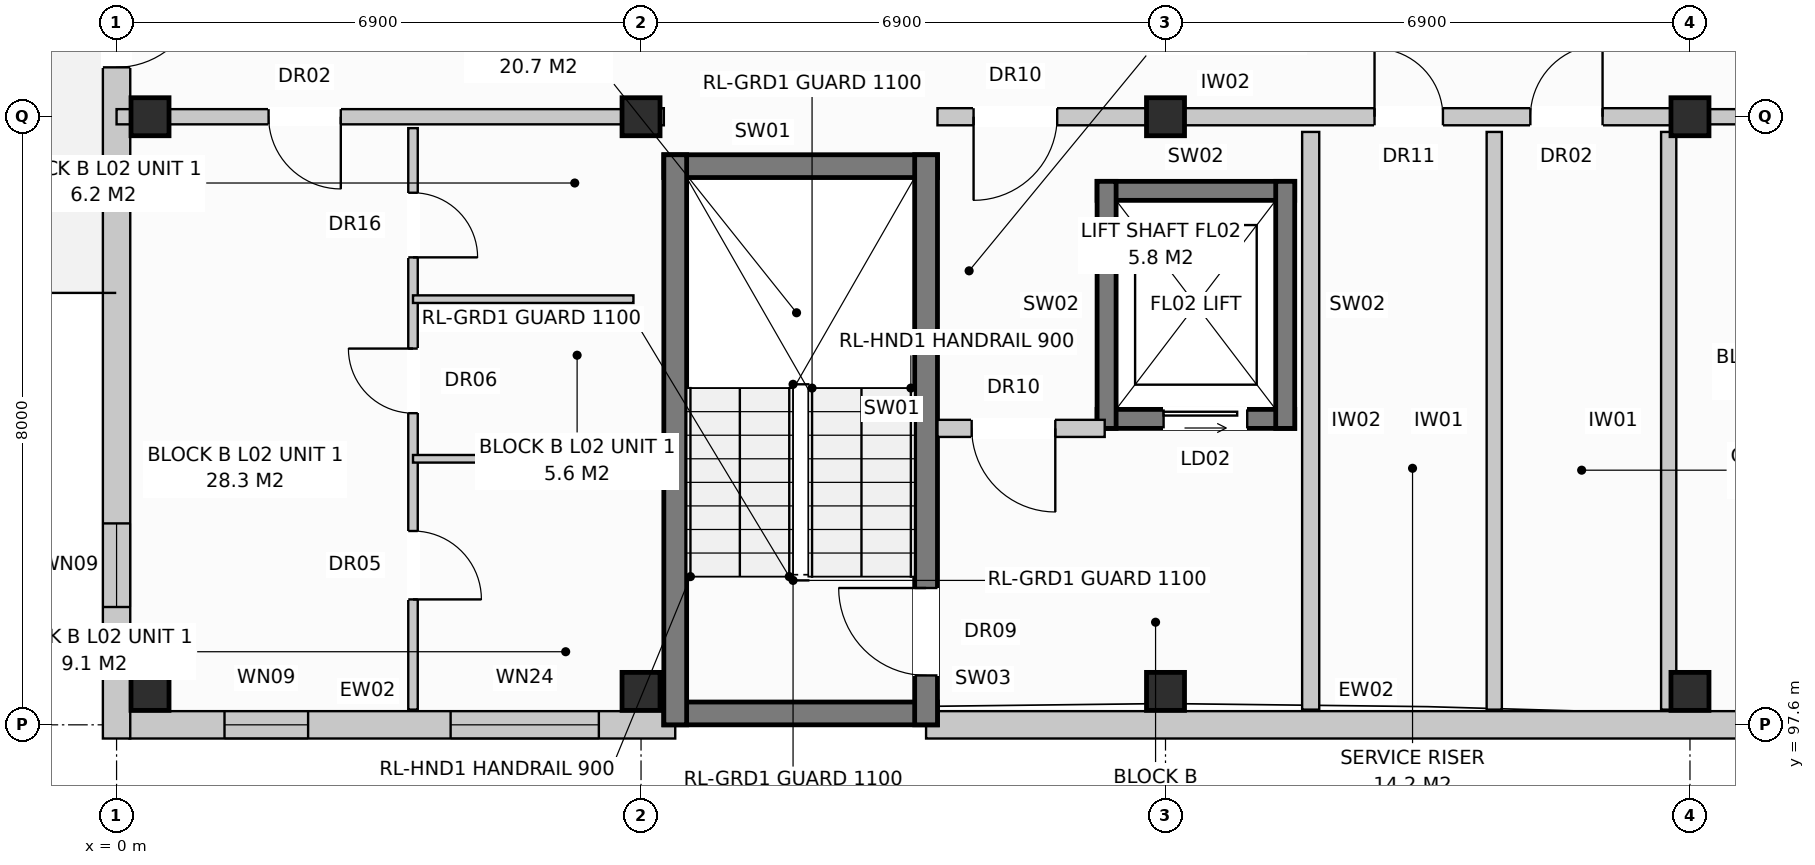
"""IFC4 building model, lengths in metres.
Left out: names, types, materials, properties, quantities, classifications, styles, units other than length and angle.
Written with IfcOpenShell. Run it as: python <this file> out.ifc"""

import sys

from ifc_helpers import new_model, si_unit, direction, frame, frame_2d, origin, origin_with_axes, origin_2d, place, context, subcontext, project, spatial, rectangle, extrude, element, fill, save


model = new_model("IFC4")
c1 = context("Model", 3, precision=1e-05, world=origin(), true_north=direction((0.0, 1.0)))
c2 = subcontext(c1, "Body", "Model", "MODEL_VIEW")
j1 = project(units=[si_unit("LENGTHUNIT", "METRE"), si_unit("PLANEANGLEUNIT", "RADIAN")], contexts=[c1])
p1 = place(None, origin())
s1 = spatial("IfcSite", under=j1, at=p1, CompositionType="ELEMENT")
p2 = place(p1, origin())
s2 = spatial("IfcBuilding", under=s1, at=p2, CompositionType="ELEMENT")
p3 = place(p2, frame((0.0, 0.0, 8.0)))
s3 = spatial("IfcBuildingStorey", under=s2, at=p3, CompositionType="ELEMENT", Elevation=8.0)
for number, where, z_axis, x_axis in (
    (1, (0.44, 98.04, 0.0), (0.0, 0.0, 1.0), (1.0, 0.0, 0.0)),
    (2, (0.44, 105.6, 0.0), (0.0, 0.0, 1.0), (1.0, 0.0, 0.0)),
    (3, (6.9, 98.04, 0.0), (0.0, 0.0, 1.0), (1.0, 0.0, 0.0)),
    (4, (6.9, 105.6, 0.0), (0.0, 0.0, 1.0), (1.0, 0.0, 0.0)),
    (5, (13.8, 98.04, 0.0), (0.0, 0.0, 1.0), (1.0, 0.0, 0.0)),
    (6, (13.8, 105.6, 0.0), (0.0, 0.0, 1.0), (1.0, 0.0, 0.0)),
    (7, (20.7, 98.04, 0.0), (0.0, 0.0, 1.0), (1.0, 0.0, 0.0)),
    (8, (20.7, 105.6, 0.0), (0.0, 0.0, 1.0), (1.0, 0.0, 0.0)),
):
    element("IfcColumn", number, at=place(p3, frame(where, z_axis=z_axis, x_axis=x_axis)), inside=s3, PredefinedType="COLUMN", context=c2, shape_type="SweptSolid", body=[
        extrude(rectangle(XDim=0.5, YDim=0.5, at=origin_2d()), origin(), (0.0, 0.0, 1.0), 3.2),
    ])
p4 = place(p3, frame((0.17, 97.6, 0.0), z_axis=(0.0, 0.0, 1.0), x_axis=(1.0, 0.0, 0.0)))
e9 = element("IfcWall", 9, at=p4, inside=s3, PredefinedType="STANDARD", context=c2, shape_type="SweptSolid", body=[
    extrude(rectangle(XDim=7.18, YDim=0.36, at=frame_2d((3.59, 0.0))), origin(), (0.0, 0.0, 1.0), 2.94),
])
p5 = place(p4, frame((1.25, 0.0, 0.72)))
e10 = element("IfcOpeningElement", 10, at=p5, cuts=e9, PredefinedType="OPENING", context=c2, shape_type="SweptSolid", body=[
    extrude(rectangle(XDim=1.1, YDim=1.5, at=frame_2d((0.55, 0.75))), frame((0.0, 0.192, 0.0), z_axis=(0.0, -1.0, 0.0), x_axis=(1.0, 0.0, 0.0)), (0.0, 0.0, 1.0), 0.384),
])
p6 = place(p4, frame((4.225, 0.0, 0.8)))
e11 = element("IfcOpeningElement", 11, at=p6, cuts=e9, PredefinedType="OPENING", context=c2, shape_type="SweptSolid", body=[
    extrude(rectangle(XDim=1.95, YDim=1.65, at=frame_2d((0.975, 0.825))), frame((0.0, 0.192, 0.0), z_axis=(0.0, -1.0, 0.0), x_axis=(1.0, 0.0, 0.0)), (0.0, 0.0, 1.0), 0.384),
])
p7 = place(p3, frame((10.65, 97.6, 0.0), z_axis=(0.0, 0.0, 1.0), x_axis=(1.0, 0.0, 0.0)))
e12 = element("IfcWall", 12, at=p7, inside=s3, PredefinedType="STANDARD", context=c2, shape_type="SweptSolid", body=[
    extrude(rectangle(XDim=17.4, YDim=0.36, at=frame_2d((8.7, 0.0))), origin(), (0.0, 0.0, 1.0), 2.94),
])
p8 = place(p7, frame((11.893, 0.0, 0.0)))
e13 = element("IfcOpeningElement", 13, at=p8, cuts=e12, PredefinedType="OPENING", context=c2, shape_type="SweptSolid", body=[
    extrude(rectangle(XDim=0.95, YDim=2.1, at=frame_2d((0.475, 1.05))), frame((0.0, 0.192, 0.0), z_axis=(0.0, -1.0, 0.0), x_axis=(1.0, 0.0, 0.0)), (0.0, 0.0, 1.0), 0.384),
])
p9 = place(p7, frame((14.97, 0.0, 0.72)))
e14 = element("IfcOpeningElement", 14, at=p9, cuts=e12, PredefinedType="OPENING", context=c2, shape_type="SweptSolid", body=[
    extrude(rectangle(XDim=1.1, YDim=1.5, at=frame_2d((0.55, 0.75))), frame((0.0, 0.192, 0.0), z_axis=(0.0, -1.0, 0.0), x_axis=(1.0, 0.0, 0.0)), (0.0, 0.0, 1.0), 0.384),
])
p10 = place(p3, frame((0.0, 97.42, 0.0), z_axis=(0.0, 0.0, 1.0), x_axis=(0.0, 1.0, 0.0)))
e15 = element("IfcWall", 15, at=p10, inside=s3, PredefinedType="STANDARD", context=c2, shape_type="SweptSolid", body=[
    extrude(rectangle(XDim=18.76, YDim=0.36, at=frame_2d((9.38, 0.0))), origin(), (0.0, 0.0, 1.0), 2.94),
])
p11 = place(p10, frame((8.83, 0.0, 0.0)))
e16 = element("IfcOpeningElement", 16, at=p11, cuts=e15, PredefinedType="OPENING", context=c2, shape_type="SweptSolid", body=[
    extrude(rectangle(XDim=1.1, YDim=2.1, at=frame_2d((0.55, 1.05))), frame((0.0, 0.192, 0.0), z_axis=(0.0, -1.0, 0.0), x_axis=(1.0, 0.0, 0.0)), (0.0, 0.0, 1.0), 0.384),
])
p12 = place(p10, frame((1.73, 0.0, 0.72)))
e17 = element("IfcOpeningElement", 17, at=p12, cuts=e15, PredefinedType="OPENING", context=c2, shape_type="SweptSolid", body=[
    extrude(rectangle(XDim=1.1, YDim=1.5, at=frame_2d((0.55, 0.75))), frame((0.0, 0.192, 0.0), z_axis=(0.0, -1.0, 0.0), x_axis=(1.0, 0.0, 0.0)), (0.0, 0.0, 1.0), 0.384),
])
p13 = place(p10, frame((15.93, 0.0, 0.72)))
e18 = element("IfcOpeningElement", 18, at=p13, cuts=e15, PredefinedType="OPENING", context=c2, shape_type="SweptSolid", body=[
    extrude(rectangle(XDim=1.1, YDim=1.5, at=frame_2d((0.55, 0.75))), frame((0.0, 0.192, 0.0), z_axis=(0.0, -1.0, 0.0), x_axis=(1.0, 0.0, 0.0)), (0.0, 0.0, 1.0), 0.384),
])
for number, where, z_axis, x_axis in (
    (19, (7.2, 97.75, 0.0), (0.0, 0.0, 1.0), (1.0, 0.0, 0.0)),
    (20, (7.2, 104.95, 0.0), (0.0, 0.0, 1.0), (1.0, 0.0, 0.0)),
):
    element("IfcWall", number, at=place(p3, frame(where, z_axis=z_axis, x_axis=x_axis)), inside=s3, PredefinedType="SHEAR", context=c2, shape_type="SweptSolid", body=[
        extrude(rectangle(XDim=3.6, YDim=0.3, at=frame_2d((1.8, 0.0))), origin(), (0.0, 0.0, 1.0), 2.94),
    ])
p14 = place(p3, frame((7.35, 97.6, 0.0), z_axis=(0.0, 0.0, 1.0), x_axis=(0.0, 1.0, 0.0)))
e21 = element("IfcWall", 21, at=p14, inside=s3, PredefinedType="SHEAR", context=c2, shape_type="SweptSolid", body=[
    extrude(rectangle(XDim=7.5, YDim=0.3, at=frame_2d((3.75, 0.0))), origin(), (0.0, 0.0, 1.0), 2.94),
])
p15 = place(p3, frame((10.65, 97.6, 0.0), z_axis=(0.0, 0.0, 1.0), x_axis=(0.0, 1.0, 0.0)))
e22 = element("IfcWall", 22, at=p15, inside=s3, PredefinedType="SHEAR", context=c2, shape_type="SweptSolid", body=[
    extrude(rectangle(XDim=7.5, YDim=0.3, at=frame_2d((3.75, 0.0))), origin(), (0.0, 0.0, 1.0), 2.94),
])
p16 = place(p15, frame((0.65, 0.0, 0.0)))
e23 = element("IfcOpeningElement", 23, at=p16, cuts=e22, PredefinedType="OPENING", context=c2, shape_type="SweptSolid", body=[
    extrude(rectangle(XDim=1.15, YDim=2.15, at=frame_2d((0.575, 1.075))), frame((0.0, 0.162, 0.0), z_axis=(0.0, -1.0, 0.0), x_axis=(1.0, 0.0, 0.0)), (0.0, 0.0, 1.0), 0.324),
])
p17 = place(p3, frame((12.9, 101.625, 0.0), z_axis=(0.0, 0.0, 1.0), x_axis=(1.0, 0.0, 0.0)))
e24 = element("IfcWall", 24, at=p17, inside=s3, PredefinedType="SHEAR", context=c2, shape_type="SweptSolid", body=[
    extrude(rectangle(XDim=2.6, YDim=0.25, at=frame_2d((1.3, 0.0))), origin(), (0.0, 0.0, 1.0), 2.94),
])
p18 = place(p17, frame((0.875, 0.0, 0.0)))
e25 = element("IfcOpeningElement", 25, at=p18, cuts=e24, PredefinedType="OPENING", context=c2, shape_type="SweptSolid", body=[
    extrude(rectangle(XDim=1.1, YDim=2.1, at=frame_2d((0.55, 1.05))), frame((0.0, 0.137, 0.0), z_axis=(0.0, -1.0, 0.0), x_axis=(1.0, 0.0, 0.0)), (0.0, 0.0, 1.0), 0.274),
])
p19 = place(p3, frame((12.9, 104.625, 0.0), z_axis=(0.0, 0.0, 1.0), x_axis=(1.0, 0.0, 0.0)))
e26 = element("IfcWall", 26, at=p19, inside=s3, PredefinedType="SHEAR", context=c2, shape_type="SweptSolid", body=[
    extrude(rectangle(XDim=2.6, YDim=0.25, at=frame_2d((1.3, 0.0))), origin(), (0.0, 0.0, 1.0), 2.94),
])
for number, where, z_axis, x_axis in (
    (27, (13.025, 101.5, 0.0), (0.0, 0.0, 1.0), (0.0, 1.0, 0.0)),
    (28, (15.375, 101.5, 0.0), (0.0, 0.0, 1.0), (0.0, 1.0, 0.0)),
):
    element("IfcWall", number, at=place(p3, frame(where, z_axis=z_axis, x_axis=x_axis)), inside=s3, PredefinedType="SHEAR", context=c2, shape_type="SweptSolid", body=[
        extrude(rectangle(XDim=3.25, YDim=0.25, at=frame_2d((1.625, 0.0))), origin(), (0.0, 0.0, 1.0), 2.94),
    ])
p20 = place(p3, frame((15.71, 97.8, 0.0), z_axis=(0.0, 0.0, 1.0), x_axis=(0.0, 1.0, 0.0)))
e29 = element("IfcWall", 29, at=p20, inside=s3, PredefinedType="PARTITIONING", context=c2, shape_type="SweptSolid", body=[
    extrude(rectangle(XDim=7.6, YDim=0.225, at=frame_2d((3.8, 0.0))), origin(), (0.0, 0.0, 1.0), 2.59),
])
p21 = place(p3, frame((10.8, 101.5, 0.0), z_axis=(0.0, 0.0, 1.0), x_axis=(1.0, 0.0, 0.0)))
e30 = element("IfcWall", 30, at=p21, inside=s3, PredefinedType="PARTITIONING", context=c2, shape_type="SweptSolid", body=[
    extrude(rectangle(XDim=2.2, YDim=0.225, at=frame_2d((1.1, 0.0))), origin(), (0.0, 0.0, 1.0), 2.94),
])
p22 = place(p21, frame((0.45, 0.0, 0.0)))
e31 = element("IfcOpeningElement", 31, at=p22, cuts=e30, PredefinedType="OPENING", context=c2, shape_type="SweptSolid", body=[
    extrude(rectangle(XDim=1.1, YDim=2.15, at=frame_2d((0.55, 1.075))), frame((0.0, 0.125, 0.0), z_axis=(0.0, -1.0, 0.0), x_axis=(1.0, 0.0, 0.0)), (0.0, 0.0, 1.0), 0.249),
])
p23 = place(p3, frame((6.9, 105.6, 0.0), z_axis=(0.0, 0.0, 1.0), x_axis=(1.0, 0.0, 0.0)))
e32 = element("IfcWall", 32, at=p23, inside=s3, PredefinedType="PARTITIONING", context=c2, shape_type="SweptSolid", body=[
    extrude(rectangle(XDim=0.3, YDim=0.225, at=frame_2d((0.15, 0.0))), origin(), (0.0, 0.0, 1.0), 2.94),
])
for number, where, z_axis, x_axis in (
    (33, (18.125, 97.8, 0.0), (0.0, 0.0, 1.0), (0.0, 1.0, 0.0)),
    (34, (20.42, 97.8, 0.0), (0.0, 0.0, 1.0), (0.0, 1.0, 0.0)),
):
    element("IfcWall", number, at=place(p3, frame(where, z_axis=z_axis, x_axis=x_axis)), inside=s3, PredefinedType="PARTITIONING", context=c2, shape_type="SweptSolid", body=[
        extrude(rectangle(XDim=7.6, YDim=0.2, at=frame_2d((3.8, 0.0))), origin(), (0.0, 0.0, 1.0), 2.94),
    ])
p24 = place(p3, frame((10.8, 105.6, 0.0), z_axis=(0.0, 0.0, 1.0), x_axis=(1.0, 0.0, 0.0)))
e35 = element("IfcWall", 35, at=p24, inside=s3, PredefinedType="PARTITIONING", context=c2, shape_type="SweptSolid", body=[
    extrude(rectangle(XDim=9.9, YDim=0.225, at=frame_2d((4.95, 0.0))), origin(), (0.0, 0.0, 1.0), 2.38),
])
p25 = place(p24, frame((0.475, 0.0, 0.0)))
e36 = element("IfcOpeningElement", 36, at=p25, cuts=e35, PredefinedType="OPENING", context=c2, shape_type="SweptSolid", body=[
    extrude(rectangle(XDim=1.1, YDim=2.15, at=frame_2d((0.55, 1.075))), frame((0.0, 0.125, 0.0), z_axis=(0.0, -1.0, 0.0), x_axis=(1.0, 0.0, 0.0)), (0.0, 0.0, 1.0), 0.249),
])
p26 = place(p24, frame((5.75, 0.0, 0.0)))
e37 = element("IfcOpeningElement", 37, at=p26, cuts=e35, PredefinedType="OPENING", context=c2, shape_type="SweptSolid", body=[
    extrude(rectangle(XDim=0.9, YDim=2.1, at=frame_2d((0.45, 1.05))), frame((0.0, 0.125, 0.0), z_axis=(0.0, -1.0, 0.0), x_axis=(1.0, 0.0, 0.0)), (0.0, 0.0, 1.0), 0.249),
])
p27 = place(p24, frame((7.8, 0.0, 0.0)))
e38 = element("IfcOpeningElement", 38, at=p27, cuts=e35, PredefinedType="OPENING", context=c2, shape_type="SweptSolid", body=[
    extrude(rectangle(XDim=0.95, YDim=2.15, at=frame_2d((0.475, 1.075))), frame((0.0, 0.125, 0.0), z_axis=(0.0, -1.0, 0.0), x_axis=(1.0, 0.0, 0.0)), (0.0, 0.0, 1.0), 0.249),
])
p28 = place(p3, frame((0.0, 105.6, 0.0), z_axis=(0.0, 0.0, 1.0), x_axis=(1.0, 0.0, 0.0)))
e39 = element("IfcWall", 39, at=p28, inside=s3, PredefinedType="PARTITIONING", context=c2, shape_type="SweptSolid", body=[
    extrude(rectangle(XDim=6.9, YDim=0.2, at=frame_2d((3.45, 0.0))), origin(), (0.0, 0.0, 1.0), 2.38),
])
p29 = place(p28, frame((2.0, 0.0, 0.0)))
e40 = element("IfcOpeningElement", 40, at=p29, cuts=e39, PredefinedType="OPENING", context=c2, shape_type="SweptSolid", body=[
    extrude(rectangle(XDim=0.95, YDim=2.15, at=frame_2d((0.475, 1.075))), frame((0.0, 0.112, 0.0), z_axis=(0.0, -1.0, 0.0), x_axis=(1.0, 0.0, 0.0)), (0.0, 0.0, 1.0), 0.224),
])
p30 = place(p3, frame((3.9, 105.45, 0.0), z_axis=(0.0, 0.0, 1.0), x_axis=(0.0, -1.0, 0.0)))
e41 = element("IfcWall", 41, at=p30, inside=s3, PredefinedType="PARTITIONING", context=c2, shape_type="SweptSolid", body=[
    extrude(rectangle(XDim=7.65, YDim=0.125, at=frame_2d((3.825, 0.0))), origin(), (0.0, 0.0, 1.0), 2.94),
])
p31 = place(p30, frame((0.85, 0.0, 0.0)))
e42 = element("IfcOpeningElement", 42, at=p31, cuts=e41, PredefinedType="OPENING", context=c2, shape_type="SweptSolid", body=[
    extrude(rectangle(XDim=0.85, YDim=2.1, at=frame_2d((0.425, 1.05))), frame((0.0, 0.074, 0.0), z_axis=(0.0, -1.0, 0.0), x_axis=(1.0, 0.0, 0.0)), (0.0, 0.0, 1.0), 0.149),
])
p32 = place(p30, frame((2.9, 0.0, 0.0)))
e43 = element("IfcOpeningElement", 43, at=p32, cuts=e41, PredefinedType="OPENING", context=c2, shape_type="SweptSolid", body=[
    extrude(rectangle(XDim=0.85, YDim=2.05, at=frame_2d((0.425, 1.025))), frame((0.0, 0.074, 0.0), z_axis=(0.0, -1.0, 0.0), x_axis=(1.0, 0.0, 0.0)), (0.0, 0.0, 1.0), 0.149),
])
p33 = place(p30, frame((5.3, 0.0, 0.0)))
e44 = element("IfcOpeningElement", 44, at=p33, cuts=e41, PredefinedType="OPENING", context=c2, shape_type="SweptSolid", body=[
    extrude(rectangle(XDim=0.9, YDim=2.1, at=frame_2d((0.45, 1.05))), frame((0.0, 0.074, 0.0), z_axis=(0.0, -1.0, 0.0), x_axis=(1.0, 0.0, 0.0)), (0.0, 0.0, 1.0), 0.149),
])
for number, where, z_axis, x_axis in (
    (45, (3.9, 103.2, 0.0), (0.0, 0.0, 1.0), (1.0, 0.0, 0.0)),
    (46, (3.9, 101.1, 0.0), (0.0, 0.0, 1.0), (1.0, 0.0, 0.0)),
):
    element("IfcWall", number, at=place(p3, frame(where, z_axis=z_axis, x_axis=x_axis)), inside=s3, PredefinedType="PARTITIONING", context=c2, shape_type="SweptSolid", body=[
        extrude(rectangle(XDim=2.9, YDim=0.1, at=frame_2d((1.45, 0.0))), origin(), (0.0, 0.0, 1.0), 2.94),
    ])
p34 = place(p3, frame((20.7, 105.6, 0.0), z_axis=(0.0, 0.0, 1.0), x_axis=(1.0, 0.0, 0.0)))
e47 = element("IfcWall", 47, at=p34, inside=s3, PredefinedType="PARTITIONING", context=c2, shape_type="SweptSolid", body=[
    extrude(rectangle(XDim=6.9, YDim=0.2, at=frame_2d((3.45, 0.0))), origin(), (0.0, 0.0, 1.0), 2.38),
])
p35 = place(p34, frame((2.0, 0.0, 0.0)))
e48 = element("IfcOpeningElement", 48, at=p35, cuts=e47, PredefinedType="OPENING", context=c2, shape_type="SweptSolid", body=[
    extrude(rectangle(XDim=0.95, YDim=2.15, at=frame_2d((0.475, 1.075))), frame((0.0, 0.112, 0.0), z_axis=(0.0, -1.0, 0.0), x_axis=(1.0, 0.0, 0.0)), (0.0, 0.0, 1.0), 0.224),
])
p36 = place(p5, origin_with_axes())
e49 = element("IfcWindow", 49, at=p36, inside=s3, PartitioningType="SINGLE_PANEL", PredefinedType="WINDOW", context=c2, shape_type="SweptSolid", body=[
    extrude(rectangle(XDim=1.1, YDim=1.5, at=frame_2d((0.55, 0.75))), frame((0.0, 0.03, 0.0), z_axis=(0.0, -1.0, 0.0), x_axis=(1.0, 0.0, 0.0)), (0.0, 0.0, 1.0), 0.06),
])
fill(e10, e49)
p37 = place(p6, origin_with_axes())
e50 = element("IfcWindow", 50, at=p37, inside=s3, PartitioningType="SINGLE_PANEL", PredefinedType="WINDOW", context=c2, shape_type="SweptSolid", body=[
    extrude(rectangle(XDim=1.95, YDim=1.65, at=frame_2d((0.975, 0.825))), frame((0.0, 0.03, 0.0), z_axis=(0.0, -1.0, 0.0), x_axis=(1.0, 0.0, 0.0)), (0.0, 0.0, 1.0), 0.06),
])
fill(e11, e50)
p38 = place(p11, frame((1.1, 0.0, 0.0), z_axis=(0.0, 0.0, 1.0), x_axis=(-1.0, 0.0, 0.0)))
e51 = element("IfcDoor", 51, at=p38, inside=s3, OperationType="SINGLE_SWING_RIGHT", PredefinedType="DOOR", context=c2, shape_type="SweptSolid", body=[
    extrude(rectangle(XDim=1.1, YDim=2.1, at=frame_2d((0.55, 1.05))), frame((0.0, 0.025, 0.0), z_axis=(0.0, -1.0, 0.0), x_axis=(1.0, 0.0, 0.0)), (0.0, 0.0, 1.0), 0.05),
])
fill(e16, e51)
p39 = place(p12, origin_with_axes())
e52 = element("IfcWindow", 52, at=p39, inside=s3, PartitioningType="SINGLE_PANEL", PredefinedType="WINDOW", context=c2, shape_type="SweptSolid", body=[
    extrude(rectangle(XDim=1.1, YDim=1.5, at=frame_2d((0.55, 0.75))), frame((0.0, 0.03, 0.0), z_axis=(0.0, -1.0, 0.0), x_axis=(1.0, 0.0, 0.0)), (0.0, 0.0, 1.0), 0.06),
])
fill(e17, e52)
p40 = place(p16, origin_with_axes())
e53 = element("IfcDoor", 53, at=p40, inside=s3, OperationType="SINGLE_SWING_RIGHT", PredefinedType="DOOR", context=c2, shape_type="SweptSolid", body=[
    extrude(rectangle(XDim=1.15, YDim=2.15, at=frame_2d((0.575, 1.075))), frame((0.0, 0.025, 0.0), z_axis=(0.0, -1.0, 0.0), x_axis=(1.0, 0.0, 0.0)), (0.0, 0.0, 1.0), 0.05),
])
fill(e23, e53)
p41 = place(p18, origin_with_axes())
e54 = element("IfcDoor", 54, at=p41, inside=s3, OperationType="SLIDING_TO_LEFT", PredefinedType="DOOR", context=c2, shape_type="SweptSolid", body=[
    extrude(rectangle(XDim=1.1, YDim=2.1, at=frame_2d((0.55, 1.05))), frame((0.0, 0.025, 0.0), z_axis=(0.0, -1.0, 0.0), x_axis=(1.0, 0.0, 0.0)), (0.0, 0.0, 1.0), 0.05),
])
fill(e25, e54)
p42 = place(p22, frame((1.1, 0.0, 0.0), z_axis=(0.0, 0.0, 1.0), x_axis=(-1.0, 0.0, 0.0)))
e55 = element("IfcDoor", 55, at=p42, inside=s3, OperationType="SINGLE_SWING_RIGHT", PredefinedType="DOOR", context=c2, shape_type="SweptSolid", body=[
    extrude(rectangle(XDim=1.1, YDim=2.15, at=frame_2d((0.55, 1.075))), frame((0.0, 0.025, 0.0), z_axis=(0.0, -1.0, 0.0), x_axis=(1.0, 0.0, 0.0)), (0.0, 0.0, 1.0), 0.05),
])
fill(e31, e55)
p43 = place(p25, frame((1.1, 0.0, 0.0), z_axis=(0.0, 0.0, 1.0), x_axis=(-1.0, 0.0, 0.0)))
e56 = element("IfcDoor", 56, at=p43, inside=s3, OperationType="SINGLE_SWING_LEFT", PredefinedType="DOOR", context=c2, shape_type="SweptSolid", body=[
    extrude(rectangle(XDim=1.1, YDim=2.15, at=frame_2d((0.55, 1.075))), frame((0.0, 0.025, 0.0), z_axis=(0.0, -1.0, 0.0), x_axis=(1.0, 0.0, 0.0)), (0.0, 0.0, 1.0), 0.05),
])
fill(e36, e56)
p44 = place(p26, origin_with_axes())
e57 = element("IfcDoor", 57, at=p44, inside=s3, OperationType="SINGLE_SWING_LEFT", PredefinedType="DOOR", context=c2, shape_type="SweptSolid", body=[
    extrude(rectangle(XDim=0.9, YDim=2.1, at=frame_2d((0.45, 1.05))), frame((0.0, 0.025, 0.0), z_axis=(0.0, -1.0, 0.0), x_axis=(1.0, 0.0, 0.0)), (0.0, 0.0, 1.0), 0.05),
])
fill(e37, e57)
p45 = place(p27, origin_with_axes())
e58 = element("IfcDoor", 58, at=p45, inside=s3, OperationType="SINGLE_SWING_RIGHT", PredefinedType="DOOR", context=c2, shape_type="SweptSolid", body=[
    extrude(rectangle(XDim=0.95, YDim=2.15, at=frame_2d((0.475, 1.075))), frame((0.0, 0.025, 0.0), z_axis=(0.0, -1.0, 0.0), x_axis=(1.0, 0.0, 0.0)), (0.0, 0.0, 1.0), 0.05),
])
fill(e38, e58)
p46 = place(p29, frame((0.95, 0.0, 0.0), z_axis=(0.0, 0.0, 1.0), x_axis=(-1.0, 0.0, 0.0)))
e59 = element("IfcDoor", 59, at=p46, inside=s3, OperationType="SINGLE_SWING_RIGHT", PredefinedType="DOOR", context=c2, shape_type="SweptSolid", body=[
    extrude(rectangle(XDim=0.95, YDim=2.15, at=frame_2d((0.475, 1.075))), frame((0.0, 0.025, 0.0), z_axis=(0.0, -1.0, 0.0), x_axis=(1.0, 0.0, 0.0)), (0.0, 0.0, 1.0), 0.05),
])
fill(e40, e59)
p47 = place(p31, origin_with_axes())
e60 = element("IfcDoor", 60, at=p47, inside=s3, OperationType="SINGLE_SWING_RIGHT", PredefinedType="DOOR", context=c2, shape_type="SweptSolid", body=[
    extrude(rectangle(XDim=0.85, YDim=2.1, at=frame_2d((0.425, 1.05))), frame((0.0, 0.025, 0.0), z_axis=(0.0, -1.0, 0.0), x_axis=(1.0, 0.0, 0.0)), (0.0, 0.0, 1.0), 0.05),
])
fill(e42, e60)
p48 = place(p32, frame((0.85, 0.0, 0.0), z_axis=(0.0, 0.0, 1.0), x_axis=(-1.0, 0.0, 0.0)))
e61 = element("IfcDoor", 61, at=p48, inside=s3, OperationType="SINGLE_SWING_LEFT", PredefinedType="DOOR", context=c2, shape_type="SweptSolid", body=[
    extrude(rectangle(XDim=0.85, YDim=2.05, at=frame_2d((0.425, 1.025))), frame((0.0, 0.025, 0.0), z_axis=(0.0, -1.0, 0.0), x_axis=(1.0, 0.0, 0.0)), (0.0, 0.0, 1.0), 0.05),
])
fill(e43, e61)
p49 = place(p33, origin_with_axes())
e62 = element("IfcDoor", 62, at=p49, inside=s3, OperationType="SINGLE_SWING_RIGHT", PredefinedType="DOOR", context=c2, shape_type="SweptSolid", body=[
    extrude(rectangle(XDim=0.9, YDim=2.1, at=frame_2d((0.45, 1.05))), frame((0.0, 0.025, 0.0), z_axis=(0.0, -1.0, 0.0), x_axis=(1.0, 0.0, 0.0)), (0.0, 0.0, 1.0), 0.05),
])
fill(e44, e62)
save(model, sys.argv[1])
